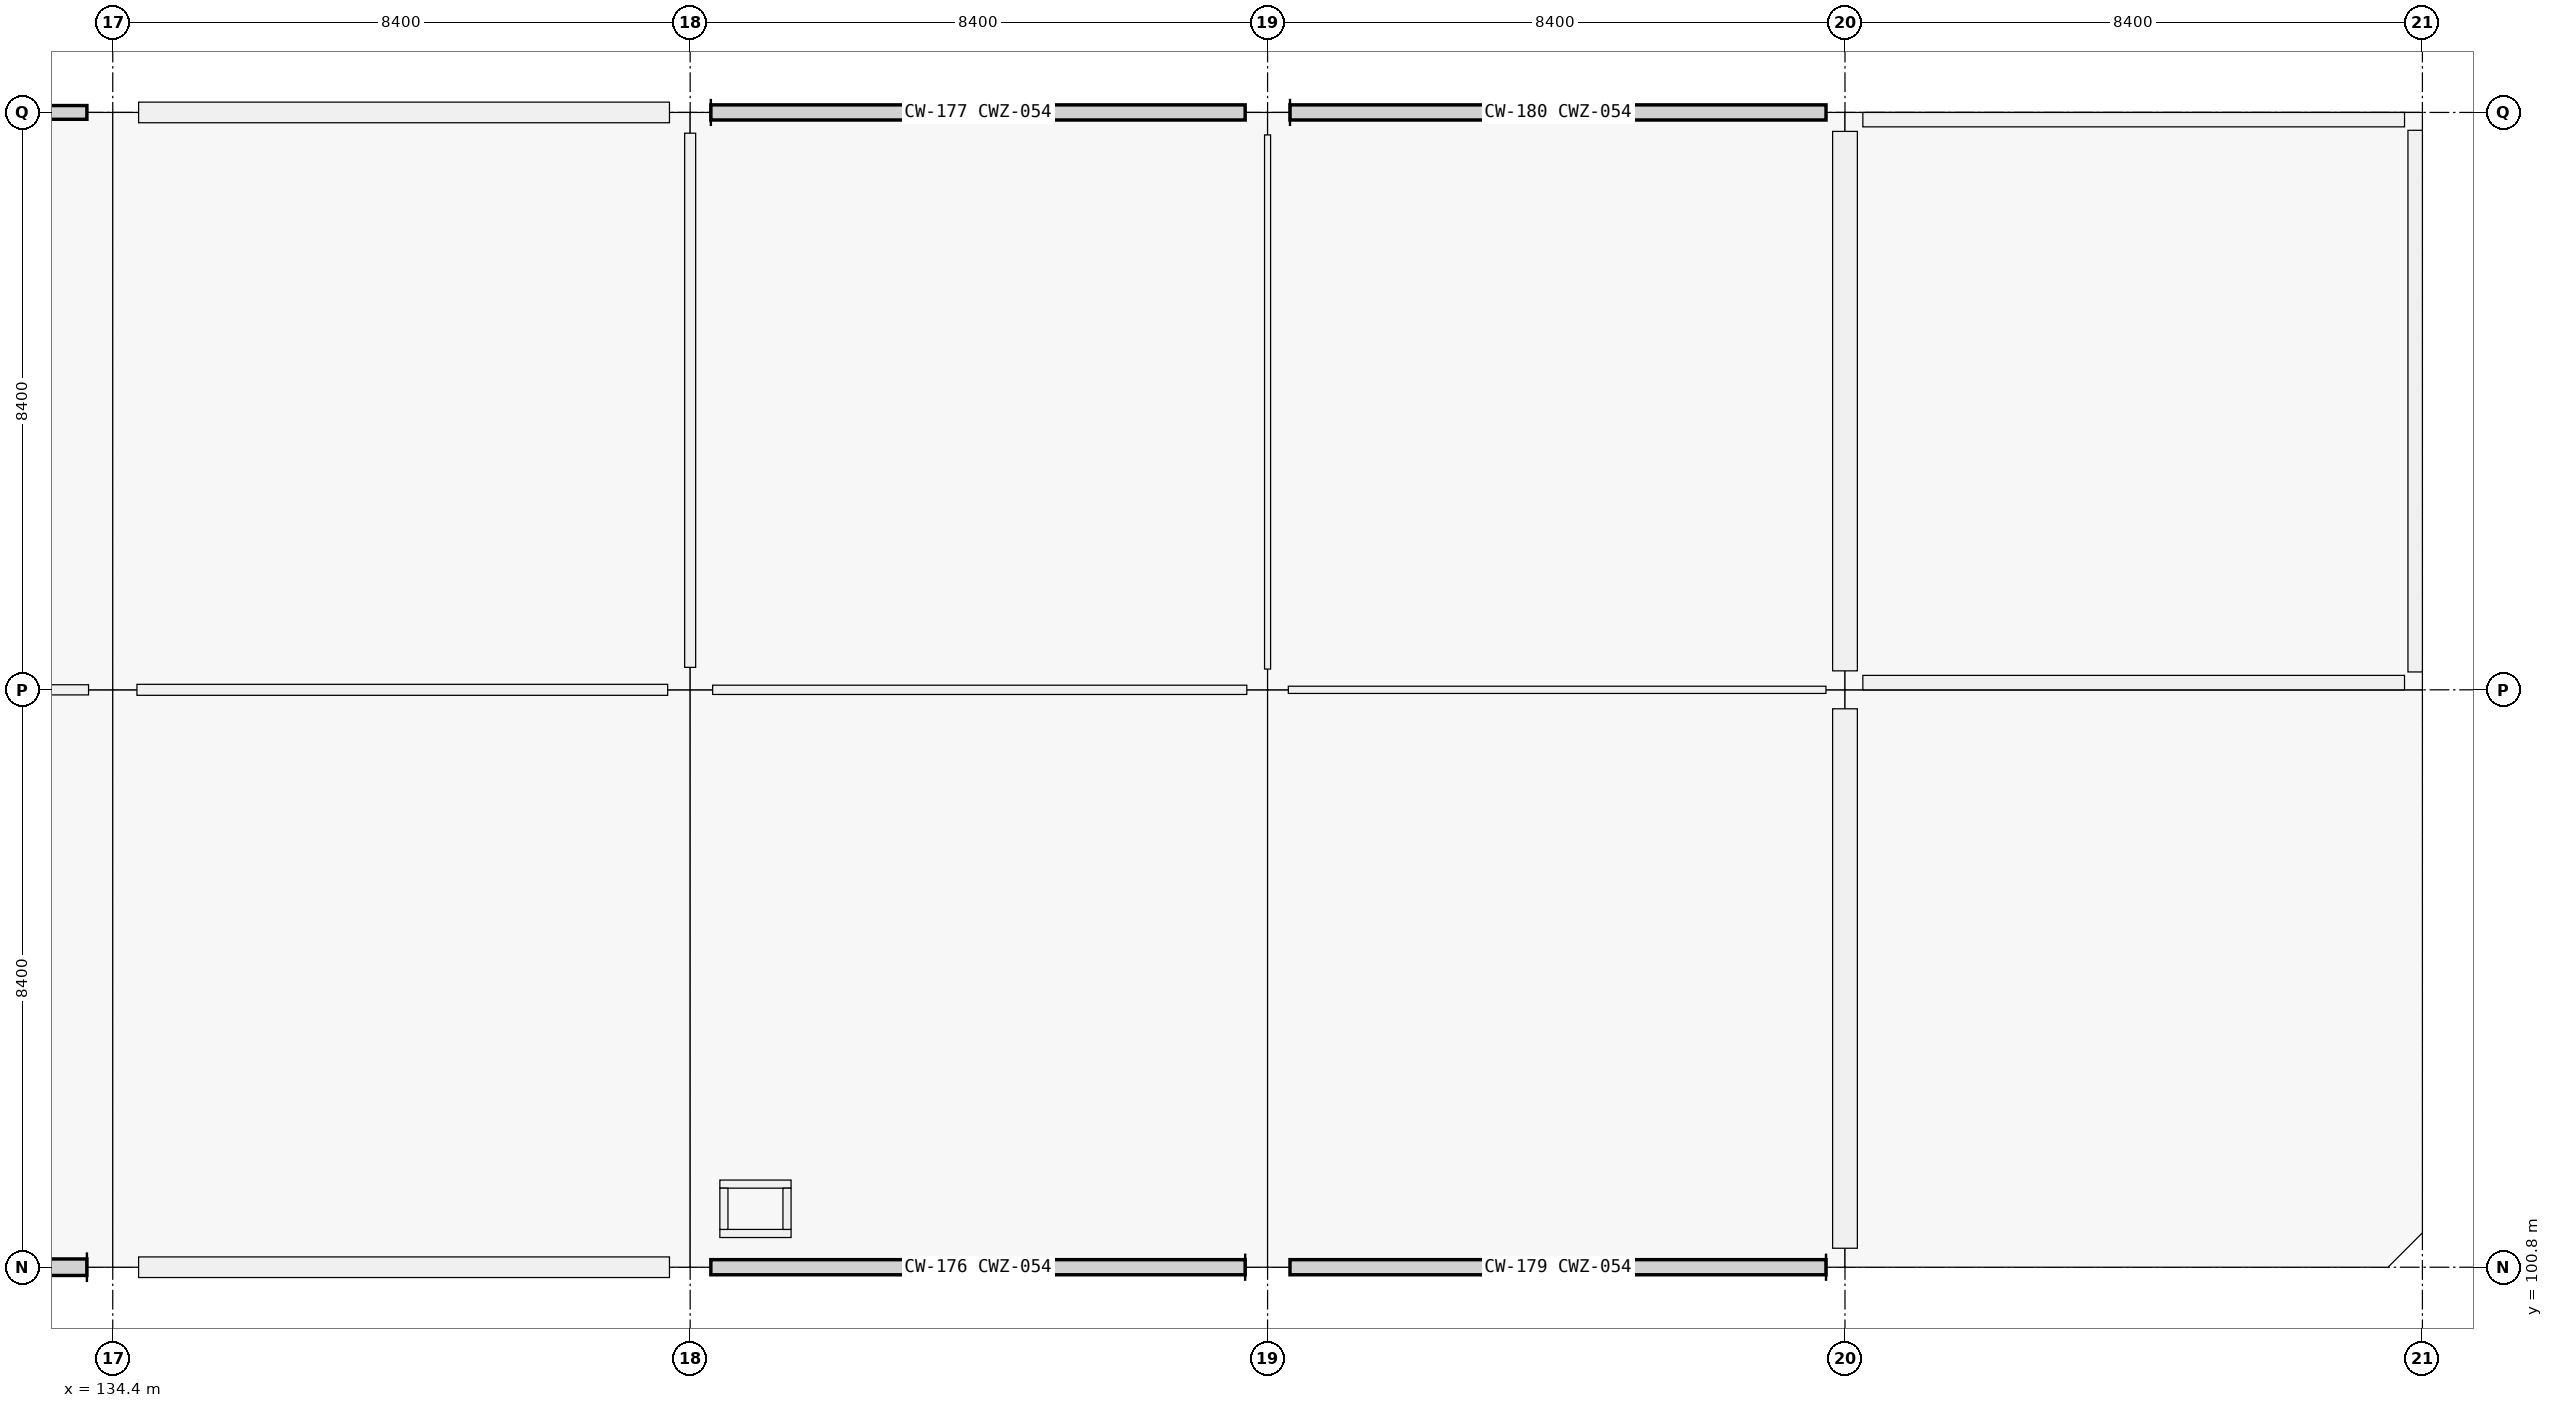
"""IFC4 building model, lengths in metres.
Left out: names, types, materials, properties, quantities, classifications, styles, units other than length and angle.
Written with IfcOpenShell. Run it as: python <this file> out.ifc"""

import sys

from ifc_helpers import new_model, si_unit, direction, frame, frame_2d, origin, origin_2d, place, context, subcontext, project, spatial, rectangle, extrude, element, fill, save


model = new_model("IFC4")
c1 = context("Model", 3, precision=1e-05, world=origin(), true_north=direction((0.0, 1.0)))
c2 = subcontext(c1, "Body", "Model", "MODEL_VIEW")
j1 = project(units=[si_unit("LENGTHUNIT", "METRE"), si_unit("PLANEANGLEUNIT", "RADIAN")], contexts=[c1])
p1 = place(None, origin())
s1 = spatial("IfcSite", under=j1, at=p1, CompositionType="ELEMENT")
p2 = place(p1, origin())
s2 = spatial("IfcBuilding", under=s1, at=p2, CompositionType="ELEMENT")
p3 = place(p2, frame((0.0, 0.0, 10.26)))
s3 = spatial("IfcBuildingStorey", under=s2, at=p3, CompositionType="ELEMENT", Elevation=10.26)
p4 = place(p3, frame((134.4, 100.8, 0.0), z_axis=(0.0, 0.0, 1.0), x_axis=(1.0, 0.0, 0.0)))
e1 = element("IfcColumn", 1, at=p4, inside=s3, PredefinedType="COLUMN", context=c2, shape_type="SweptSolid", body=[
    extrude(rectangle(XDim=0.75, YDim=0.75, at=origin_2d()), origin(), (0.0, 0.0, 1.0), 4.5),
])
p5 = place(p3, frame((134.4, 109.2, 0.0), z_axis=(0.0, 0.0, 1.0), x_axis=(1.0, 0.0, 0.0)))
e2 = element("IfcColumn", 2, at=p5, inside=s3, PredefinedType="COLUMN", context=c2, shape_type="SweptSolid", body=[
    extrude(rectangle(XDim=0.7, YDim=0.7, at=origin_2d()), origin(), (0.0, 0.0, 1.0), 4.5),
])
p6 = place(p3, frame((134.4, 117.6, 0.0), z_axis=(0.0, 0.0, 1.0), x_axis=(1.0, 0.0, 0.0)))
e3 = element("IfcColumn", 3, at=p6, inside=s3, PredefinedType="COLUMN", context=c2, shape_type="SweptSolid", body=[
    extrude(rectangle(XDim=0.75, YDim=0.75, at=origin_2d()), origin(), (0.0, 0.0, 1.0), 4.5),
])
p7 = place(p3, frame((142.8, 100.8, 0.0), z_axis=(0.0, 0.0, 1.0), x_axis=(1.0, 0.0, 0.0)))
e4 = element("IfcColumn", 4, at=p7, inside=s3, PredefinedType="COLUMN", context=c2, shape_type="SweptSolid", body=[
    extrude(rectangle(XDim=0.6, YDim=0.6, at=origin_2d()), origin(), (0.0, 0.0, 1.0), 4.5),
])
p8 = place(p3, frame((142.8, 109.2, 0.0), z_axis=(0.0, 0.0, 1.0), x_axis=(1.0, 0.0, 0.0)))
e5 = element("IfcColumn", 5, at=p8, inside=s3, PredefinedType="COLUMN", context=c2, shape_type="SweptSolid", body=[
    extrude(rectangle(XDim=0.65, YDim=0.65, at=origin_2d()), origin(), (0.0, 0.0, 1.0), 4.5),
])
p9 = place(p3, frame((142.8, 117.6, 0.0), z_axis=(0.0, 0.0, 1.0), x_axis=(1.0, 0.0, 0.0)))
e6 = element("IfcColumn", 6, at=p9, inside=s3, PredefinedType="COLUMN", context=c2, shape_type="SweptSolid", body=[
    extrude(rectangle(XDim=0.6, YDim=0.6, at=origin_2d()), origin(), (0.0, 0.0, 1.0), 4.5),
])
p10 = place(p3, frame((151.2, 100.8, 0.0), z_axis=(0.0, 0.0, 1.0), x_axis=(1.0, 0.0, 0.0)))
e7 = element("IfcColumn", 7, at=p10, inside=s3, PredefinedType="COLUMN", context=c2, shape_type="SweptSolid", body=[
    extrude(rectangle(XDim=0.65, YDim=0.65, at=origin_2d()), origin(), (0.0, 0.0, 1.0), 4.5),
])
p11 = place(p3, frame((151.2, 109.2, 0.0), z_axis=(0.0, 0.0, 1.0), x_axis=(1.0, 0.0, 0.0)))
e8 = element("IfcColumn", 8, at=p11, inside=s3, PredefinedType="COLUMN", context=c2, shape_type="SweptSolid", body=[
    extrude(rectangle(XDim=0.6, YDim=0.6, at=origin_2d()), origin(), (0.0, 0.0, 1.0), 4.5),
])
p12 = place(p3, frame((151.2, 117.6, 0.0), z_axis=(0.0, 0.0, 1.0), x_axis=(1.0, 0.0, 0.0)))
e9 = element("IfcColumn", 9, at=p12, inside=s3, PredefinedType="COLUMN", context=c2, shape_type="SweptSolid", body=[
    extrude(rectangle(XDim=0.65, YDim=0.65, at=origin_2d()), origin(), (0.0, 0.0, 1.0), 4.5),
])
for number, where, z_axis, x_axis in (
    (10, (159.6, 100.8, 0.0), (0.0, 0.0, 1.0), (1.0, 0.0, 0.0)),
    (11, (159.6, 109.2, 0.0), (0.0, 0.0, 1.0), (1.0, 0.0, 0.0)),
    (12, (159.6, 117.6, 0.0), (0.0, 0.0, 1.0), (1.0, 0.0, 0.0)),
):
    element("IfcColumn", number, at=place(p3, frame(where, z_axis=z_axis, x_axis=x_axis)), inside=s3, PredefinedType="COLUMN", context=c2, shape_type="SweptSolid", body=[
        extrude(rectangle(XDim=0.55, YDim=0.55, at=origin_2d()), origin(), (0.0, 0.0, 1.0), 4.25),
    ])
p13 = place(p3, frame((142.499, 100.8, 0.0), z_axis=(0.0, 0.0, 1.0), x_axis=(-1.0, 0.0, 0.0)))
e13 = element("IfcWall", 13, at=p13, inside=s3, PredefinedType="SOLIDWALL", context=c2, shape_type="SweptSolid", body=[
    extrude(rectangle(XDim=7.723, YDim=0.3, at=frame_2d((3.862, 0.0))), origin(), (0.0, 0.0, 1.0), 3.54),
])
p14 = place(p13, frame((2.486, 0.0, 0.9)))
e14 = element("IfcOpeningElement", 14, at=p14, cuts=e13, PredefinedType="OPENING", context=c2, shape_type="SweptSolid", body=[
    extrude(rectangle(XDim=2.75, YDim=1.6, at=frame_2d((1.375, 0.8))), frame((0.0, 0.15, 0.0), z_axis=(0.0, -1.0, 0.0), x_axis=(1.0, 0.0, 0.0)), (0.0, 0.0, 1.0), 0.3),
])
p15 = place(p3, frame((134.776, 117.6, 0.0), z_axis=(0.0, 0.0, 1.0), x_axis=(1.0, 0.0, 0.0)))
e15 = element("IfcWall", 15, at=p15, inside=s3, PredefinedType="SOLIDWALL", context=c2, shape_type="SweptSolid", body=[
    extrude(rectangle(XDim=7.723, YDim=0.3, at=frame_2d((3.862, 0.0))), origin(), (0.0, 0.0, 1.0), 3.54),
])
p16 = place(p15, frame((3.087, 0.0, 0.9)))
e16 = element("IfcOpeningElement", 16, at=p16, cuts=e15, PredefinedType="OPENING", context=c2, shape_type="SweptSolid", body=[
    extrude(rectangle(XDim=1.55, YDim=1.6, at=frame_2d((0.775, 0.8))), frame((0.0, 0.15, 0.0), z_axis=(0.0, -1.0, 0.0), x_axis=(1.0, 0.0, 0.0)), (0.0, 0.0, 1.0), 0.3),
])
p17 = place(p3, frame((159.6, 108.924, 0.0), z_axis=(0.0, 0.0, 1.0), x_axis=(0.0, -1.0, 0.0)))
e17 = element("IfcWall", 17, at=p17, inside=s3, PredefinedType="SOLIDWALL", context=c2, shape_type="SweptSolid", body=[
    extrude(rectangle(XDim=7.848, YDim=0.36, at=frame_2d((3.924, 0.0))), origin(), (0.0, 0.0, 1.0), 3.54),
])
p18 = place(p17, frame((3.099, 0.0, 0.0)))
e18 = element("IfcOpeningElement", 18, at=p18, cuts=e17, PredefinedType="OPENING", context=c2, shape_type="SweptSolid", body=[
    extrude(rectangle(XDim=1.65, YDim=2.2, at=frame_2d((0.825, 1.1))), frame((0.0, 0.18, 0.0), z_axis=(0.0, -1.0, 0.0), x_axis=(1.0, 0.0, 0.0)), (0.0, 0.0, 1.0), 0.36),
])
p19 = place(p3, frame((159.6, 117.324, 0.0), z_axis=(0.0, 0.0, 1.0), x_axis=(0.0, -1.0, 0.0)))
e19 = element("IfcWall", 19, at=p19, inside=s3, PredefinedType="SOLIDWALL", context=c2, shape_type="SweptSolid", body=[
    extrude(rectangle(XDim=7.848, YDim=0.36, at=frame_2d((3.924, 0.0))), origin(), (0.0, 0.0, 1.0), 3.54),
])
p20 = place(p19, frame((3.174, 0.0, 0.9)))
e20 = element("IfcOpeningElement", 20, at=p20, cuts=e19, PredefinedType="OPENING", context=c2, shape_type="SweptSolid", body=[
    extrude(rectangle(XDim=1.5, YDim=1.8, at=frame_2d((0.75, 0.9))), frame((0.0, 0.18, 0.0), z_axis=(0.0, -1.0, 0.0), x_axis=(1.0, 0.0, 0.0)), (0.0, 0.0, 1.0), 0.36),
])
for number, where, z_axis, x_axis in (
    (21, (167.74, 109.305, 0.0), (0.0, 0.0, 1.0), (-1.0, 0.0, 0.0)),
    (22, (159.86, 117.495, 0.0), (0.0, 0.0, 1.0), (1.0, 0.0, 0.0)),
):
    element("IfcWall", number, at=place(p3, frame(where, z_axis=z_axis, x_axis=x_axis)), inside=s3, PredefinedType="PARAPET", context=c2, shape_type="SweptSolid", body=[
        extrude(rectangle(XDim=7.88, YDim=0.21, at=frame_2d((3.94, 0.0))), origin(), (0.0, 0.0, 1.0), 0.95),
    ])
p21 = place(p3, frame((167.895, 117.34, 0.0), z_axis=(0.0, 0.0, 1.0), x_axis=(0.0, -1.0, 0.0)))
e23 = element("IfcWall", 23, at=p21, inside=s3, PredefinedType="PARAPET", context=c2, shape_type="SweptSolid", body=[
    extrude(rectangle(XDim=7.88, YDim=0.21, at=frame_2d((3.94, 0.0))), origin(), (0.0, 0.0, 1.0), 0.95),
])
for number, where, z_axis, x_axis in (
    (24, (143.232, 101.291, 0.0), (0.0, 0.0, 1.0), (1.0, 0.0, 0.0)),
    (25, (143.232, 102.009, 0.0), (0.0, 0.0, 1.0), (1.0, 0.0, 0.0)),
):
    element("IfcWall", number, at=place(p3, frame(where, z_axis=z_axis, x_axis=x_axis)), inside=s3, PredefinedType="PARTITIONING", context=c2, shape_type="SweptSolid", body=[
        extrude(rectangle(XDim=1.036, YDim=0.118, at=frame_2d((0.518, 0.0))), origin(), (0.0, 0.0, 1.0), 3.53),
    ])
for number, where, z_axis, x_axis in (
    (26, (143.291, 101.35, 0.0), (0.0, 0.0, 1.0), (0.0, 1.0, 0.0)),
    (27, (144.209, 101.35, 0.0), (0.0, 0.0, 1.0), (0.0, 1.0, 0.0)),
):
    element("IfcWall", number, at=place(p3, frame(where, z_axis=z_axis, x_axis=x_axis)), inside=s3, PredefinedType="PARTITIONING", context=c2, shape_type="SweptSolid", body=[
        extrude(rectangle(XDim=0.6, YDim=0.118, at=frame_2d((0.3, 0.0))), origin(), (0.0, 0.0, 1.0), 3.53),
    ])
p22 = place(p3, frame((126.427, 109.2, 0.0), z_axis=(0.0, 0.0, 1.0), x_axis=(1.0, 0.0, 0.0)))
e28 = element("IfcWall", 28, at=p22, inside=s3, PredefinedType="PARTITIONING", context=c2, shape_type="SweptSolid", body=[
    extrude(rectangle(XDim=7.621, YDim=0.148, at=frame_2d((3.811, 0.0))), origin(), (0.0, 0.0, 1.0), 3.37),
])
p23 = place(p22, frame((3.361, 0.0, 0.0)))
e29 = element("IfcOpeningElement", 29, at=p23, cuts=e28, PredefinedType="OPENING", context=c2, shape_type="SweptSolid", body=[
    extrude(rectangle(XDim=0.9, YDim=2.05, at=frame_2d((0.45, 1.025))), frame((0.0, 0.074, 0.0), z_axis=(0.0, -1.0, 0.0), x_axis=(1.0, 0.0, 0.0)), (0.0, 0.0, 1.0), 0.148),
])
p24 = place(p3, frame((134.752, 109.2, 0.0), z_axis=(0.0, 0.0, 1.0), x_axis=(1.0, 0.0, 0.0)))
e30 = element("IfcWall", 30, at=p24, inside=s3, PredefinedType="PARTITIONING", context=c2, shape_type="SweptSolid", body=[
    extrude(rectangle(XDim=7.721, YDim=0.16, at=frame_2d((3.86, 0.0))), origin(), (0.0, 0.0, 1.0), 3.37),
])
p25 = place(p24, frame((3.061, 0.0, 0.0)))
e31 = element("IfcOpeningElement", 31, at=p25, cuts=e30, PredefinedType="OPENING", context=c2, shape_type="SweptSolid", body=[
    extrude(rectangle(XDim=1.6, YDim=2.2, at=frame_2d((0.8, 1.1))), frame((0.0, 0.08, 0.0), z_axis=(0.0, -1.0, 0.0), x_axis=(1.0, 0.0, 0.0)), (0.0, 0.0, 1.0), 0.16),
])
p26 = place(p3, frame((143.127, 109.2, 0.0), z_axis=(0.0, 0.0, 1.0), x_axis=(1.0, 0.0, 0.0)))
e32 = element("IfcWall", 32, at=p26, inside=s3, PredefinedType="PARTITIONING", context=c2, shape_type="SweptSolid", body=[
    extrude(rectangle(XDim=7.771, YDim=0.135, at=frame_2d((3.885, 0.0))), origin(), (0.0, 0.0, 1.0), 3.37),
])
p27 = place(p26, frame((3.361, 0.0, 0.0)))
e33 = element("IfcOpeningElement", 33, at=p27, cuts=e32, PredefinedType="OPENING", context=c2, shape_type="SweptSolid", body=[
    extrude(rectangle(XDim=1.05, YDim=2.12, at=frame_2d((0.525, 1.06))), frame((0.0, 0.067, 0.0), z_axis=(0.0, -1.0, 0.0), x_axis=(1.0, 0.0, 0.0)), (0.0, 0.0, 1.0), 0.135),
])
p28 = place(p3, frame((151.502, 109.2, 0.0), z_axis=(0.0, 0.0, 1.0), x_axis=(1.0, 0.0, 0.0)))
e34 = element("IfcWall", 34, at=p28, inside=s3, PredefinedType="PARTITIONING", context=c2, shape_type="SweptSolid", body=[
    extrude(rectangle(XDim=7.821, YDim=0.105, at=frame_2d((3.911, 0.0))), origin(), (0.0, 0.0, 1.0), 3.37),
])
p29 = place(p28, frame((3.405, 0.0, 0.0)))
e35 = element("IfcOpeningElement", 35, at=p29, cuts=e34, PredefinedType="OPENING", context=c2, shape_type="SweptSolid", body=[
    extrude(rectangle(XDim=1.01, YDim=2.12, at=frame_2d((0.505, 1.06))), frame((0.0, 0.052, 0.0), z_axis=(0.0, -1.0, 0.0), x_axis=(1.0, 0.0, 0.0)), (0.0, 0.0, 1.0), 0.105),
])
p30 = place(p3, frame((142.8, 109.527, 0.0), z_axis=(0.0, 0.0, 1.0), x_axis=(0.0, 1.0, 0.0)))
e36 = element("IfcWall", 36, at=p30, inside=s3, PredefinedType="PARTITIONING", context=c2, shape_type="SweptSolid", body=[
    extrude(rectangle(XDim=7.771, YDim=0.16, at=frame_2d((3.885, 0.0))), origin(), (0.0, 0.0, 1.0), 3.37),
])
p31 = place(p30, frame((3.335, 0.0, 0.0)))
e37 = element("IfcOpeningElement", 37, at=p31, cuts=e36, PredefinedType="OPENING", context=c2, shape_type="SweptSolid", body=[
    extrude(rectangle(XDim=1.1, YDim=2.15, at=frame_2d((0.55, 1.075))), frame((0.0, 0.08, 0.0), z_axis=(0.0, -1.0, 0.0), x_axis=(1.0, 0.0, 0.0)), (0.0, 0.0, 1.0), 0.16),
])
p32 = place(p3, frame((151.2, 109.502, 0.0), z_axis=(0.0, 0.0, 1.0), x_axis=(0.0, 1.0, 0.0)))
e38 = element("IfcWall", 38, at=p32, inside=s3, PredefinedType="PARTITIONING", context=c2, shape_type="SweptSolid", body=[
    extrude(rectangle(XDim=7.771, YDim=0.088, at=frame_2d((3.885, 0.0))), origin(), (0.0, 0.0, 1.0), 3.37),
])
p33 = place(p32, frame((3.421, 0.0, 0.0)))
e39 = element("IfcOpeningElement", 39, at=p33, cuts=e38, PredefinedType="OPENING", context=c2, shape_type="SweptSolid", body=[
    extrude(rectangle(XDim=0.93, YDim=2.12, at=frame_2d((0.465, 1.06))), frame((0.0, 0.044, 0.0), z_axis=(0.0, -1.0, 0.0), x_axis=(1.0, 0.0, 0.0)), (0.0, 0.0, 1.0), 0.088),
])
p34 = place(p14, origin())
e40 = element("IfcWindow", 40, at=p34, inside=s3, PartitioningType="SINGLE_PANEL", PredefinedType="WINDOW", context=c2, shape_type="SweptSolid", body=[
    extrude(rectangle(XDim=2.75, YDim=1.6, at=frame_2d((1.375, 0.8))), frame((0.0, 0.03, 0.0), z_axis=(0.0, -1.0, 0.0), x_axis=(1.0, 0.0, 0.0)), (0.0, 0.0, 1.0), 0.06),
])
fill(e14, e40)
p35 = place(p16, origin())
e41 = element("IfcWindow", 41, at=p35, inside=s3, PartitioningType="SINGLE_PANEL", PredefinedType="WINDOW", context=c2, shape_type="SweptSolid", body=[
    extrude(rectangle(XDim=1.55, YDim=1.6, at=frame_2d((0.775, 0.8))), frame((0.0, 0.03, 0.0), z_axis=(0.0, -1.0, 0.0), x_axis=(1.0, 0.0, 0.0)), (0.0, 0.0, 1.0), 0.06),
])
fill(e16, e41)
p36 = place(p18, origin())
e42 = element("IfcDoor", 42, at=p36, inside=s3, OperationType="DOUBLE_DOOR_SINGLE_SWING", PredefinedType="DOOR", context=c2, shape_type="SweptSolid", body=[
    extrude(rectangle(XDim=1.65, YDim=2.2, at=frame_2d((0.825, 1.1))), frame((0.0, 0.025, 0.0), z_axis=(0.0, -1.0, 0.0), x_axis=(1.0, 0.0, 0.0)), (0.0, 0.0, 1.0), 0.05),
])
fill(e18, e42)
p37 = place(p20, origin())
e43 = element("IfcWindow", 43, at=p37, inside=s3, PartitioningType="SINGLE_PANEL", PredefinedType="WINDOW", context=c2, shape_type="SweptSolid", body=[
    extrude(rectangle(XDim=1.5, YDim=1.8, at=frame_2d((0.75, 0.9))), frame((0.0, 0.03, 0.0), z_axis=(0.0, -1.0, 0.0), x_axis=(1.0, 0.0, 0.0)), (0.0, 0.0, 1.0), 0.06),
])
fill(e20, e43)
p38 = place(p3, frame((0.0, 0.0, -0.3)))
p39 = place(p38, frame((163.8, 113.4, 0.0)))
p40 = place(p39, frame((0.0, 0.0, 0.25)))
e44 = element("IfcWindow", 44, at=p40, inside=s3, PartitioningType="SINGLE_PANEL", PredefinedType="SKYLIGHT", context=c2, shape_type="SweptSolid", body=[
    extrude(rectangle(XDim=2.1, YDim=1.4, at=origin_2d()), origin(), (0.0, 0.0, 1.0), 0.05),
])
p41 = place(p25, origin())
e45 = element("IfcDoor", 45, at=p41, inside=s3, OperationType="DOUBLE_DOOR_SINGLE_SWING", PredefinedType="DOOR", context=c2, shape_type="SweptSolid", body=[
    extrude(rectangle(XDim=1.6, YDim=2.2, at=frame_2d((0.8, 1.1))), frame((0.0, 0.025, 0.0), z_axis=(0.0, -1.0, 0.0), x_axis=(1.0, 0.0, 0.0)), (0.0, 0.0, 1.0), 0.05),
])
fill(e31, e45)
p42 = place(p27, origin())
e46 = element("IfcDoor", 46, at=p42, inside=s3, OperationType="SINGLE_SWING_RIGHT", PredefinedType="DOOR", context=c2, shape_type="SweptSolid", body=[
    extrude(rectangle(XDim=1.05, YDim=2.12, at=frame_2d((0.525, 1.06))), frame((0.0, 0.025, 0.0), z_axis=(0.0, -1.0, 0.0), x_axis=(1.0, 0.0, 0.0)), (0.0, 0.0, 1.0), 0.05),
])
fill(e33, e46)
p43 = place(p29, origin())
e47 = element("IfcDoor", 47, at=p43, inside=s3, OperationType="SINGLE_SWING_LEFT", PredefinedType="DOOR", context=c2, shape_type="SweptSolid", body=[
    extrude(rectangle(XDim=1.01, YDim=2.12, at=frame_2d((0.505, 1.06))), frame((0.0, 0.025, 0.0), z_axis=(0.0, -1.0, 0.0), x_axis=(1.0, 0.0, 0.0)), (0.0, 0.0, 1.0), 0.05),
])
fill(e35, e47)
p44 = place(p31, origin())
e48 = element("IfcDoor", 48, at=p44, inside=s3, OperationType="SINGLE_SWING_LEFT", PredefinedType="DOOR", context=c2, shape_type="SweptSolid", body=[
    extrude(rectangle(XDim=1.1, YDim=2.15, at=frame_2d((0.55, 1.075))), frame((0.0, 0.025, 0.0), z_axis=(0.0, -1.0, 0.0), x_axis=(1.0, 0.0, 0.0)), (0.0, 0.0, 1.0), 0.05),
])
fill(e37, e48)
p45 = place(p33, origin())
e49 = element("IfcDoor", 49, at=p45, inside=s3, OperationType="SINGLE_SWING_RIGHT", PredefinedType="DOOR", context=c2, shape_type="SweptSolid", body=[
    extrude(rectangle(XDim=0.93, YDim=2.12, at=frame_2d((0.465, 1.06))), frame((0.0, 0.025, 0.0), z_axis=(0.0, -1.0, 0.0), x_axis=(1.0, 0.0, 0.0)), (0.0, 0.0, 1.0), 0.05),
])
fill(e39, e49)
save(model, sys.argv[1])
